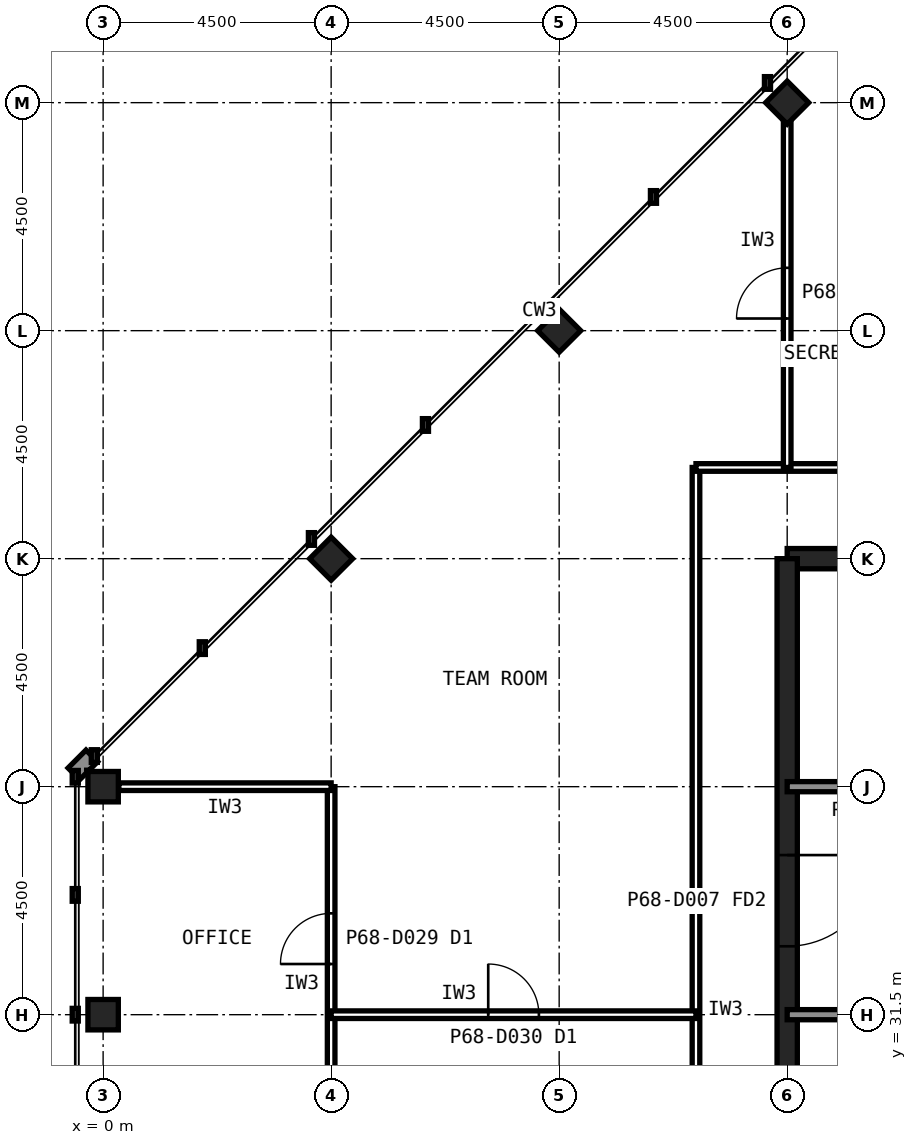
"""IFC4 building model, lengths in metres.
Left out: names, types, materials, properties, quantities, classifications, styles, units other than length and angle.
Written with IfcOpenShell. Run it as: python <this file> out.ifc"""

import sys

from ifc_helpers import new_model, si_unit, direction, frame, frame_2d, origin, origin_2d, place, context, subcontext, project, spatial, rectangle, hollow_rectangle, extrude, element, fill, save


model = new_model("IFC4")
c1 = context("Model", 3, precision=1e-05, world=origin(), true_north=direction((0.0, 1.0)))
c2 = subcontext(c1, "Body", "Model", "MODEL_VIEW")
j1 = project(units=[si_unit("LENGTHUNIT", "METRE"), si_unit("PLANEANGLEUNIT", "RADIAN")], contexts=[c1])
p1 = place(None, origin())
s1 = spatial("IfcSite", under=j1, at=p1, CompositionType="ELEMENT")
p2 = place(p1, origin())
s2 = spatial("IfcBuilding", under=s1, at=p2, CompositionType="ELEMENT")
p3 = place(p2, frame((0.0, 0.0, 286.6)))
s3 = spatial("IfcBuildingStorey", under=s2, at=p3, CompositionType="ELEMENT", Elevation=286.6)
for number, where, z_axis, x_axis in (
    (1, (0.0, 36.0, 0.0), (0.0, 0.0, 1.0), (1.0, 0.0, 0.0)),
    (2, (0.0, 31.5, 0.0), (0.0, 0.0, 1.0), (1.0, 0.0, 0.0)),
    (3, (4.5, 40.5, 0.0), (0.0, 0.0, 1.0), (0.707, 0.707, 0.0)),
    (4, (9.0, 45.0, 0.0), (0.0, 0.0, 1.0), (0.707, 0.707, 0.0)),
    (5, (13.5, 49.5, 0.0), (0.0, 0.0, 1.0), (0.707, 0.707, 0.0)),
):
    element("IfcColumn", number, at=place(p3, frame(where, z_axis=z_axis, x_axis=x_axis)), inside=s3, PredefinedType="COLUMN", context=c2, shape_type="SweptSolid", body=[
        extrude(hollow_rectangle(XDim=0.6, YDim=0.6, WallThickness=0.028, at=origin_2d()), origin(), (0.0, 0.0, 1.0), 4.0),
    ])
p4 = place(p3, frame((40.5, 40.5, 0.0), z_axis=(0.0, 0.0, 1.0), x_axis=(-1.0, 0.0, 0.0)))
e6 = element("IfcWall", 6, at=p4, inside=s3, PredefinedType="SHEAR", context=c2, shape_type="SweptSolid", body=[
    extrude(rectangle(XDim=27.0, YDim=0.4, at=frame_2d((13.5, 0.0))), origin(), (0.0, 0.0, 1.0), 4.0),
])
p5 = place(p3, frame((13.5, 40.5, 0.0), z_axis=(0.0, 0.0, 1.0), x_axis=(0.0, -1.0, 0.0)))
e7 = element("IfcWall", 7, at=p5, inside=s3, PredefinedType="SHEAR", context=c2, shape_type="SweptSolid", body=[
    extrude(rectangle(XDim=27.0, YDim=0.4, at=frame_2d((13.5, 0.0))), origin(), (0.0, 0.0, 1.0), 4.0),
])
p6 = place(p5, frame((19.65, 0.0, 0.0)))
e8 = element("IfcOpeningElement", 8, at=p6, cuts=e7, PredefinedType="OPENING", context=c2, shape_type="SweptSolid", body=[
    extrude(rectangle(XDim=1.2, YDim=2.1, at=frame_2d((0.6, 1.05))), frame((0.0, 0.21, 0.0), z_axis=(0.0, -1.0, 0.0), x_axis=(1.0, 0.0, 0.0)), (0.0, 0.0, 1.0), 0.42),
])
p7 = place(p5, frame((5.85, 0.0, 0.0)))
e9 = element("IfcOpeningElement", 9, at=p7, cuts=e7, PredefinedType="OPENING", context=c2, shape_type="SweptSolid", body=[
    extrude(rectangle(XDim=1.8, YDim=2.1, at=frame_2d((0.9, 1.05))), frame((0.0, 0.21, 0.0), z_axis=(0.0, -1.0, 0.0), x_axis=(1.0, 0.0, 0.0)), (0.0, 0.0, 1.0), 0.42),
])
p8 = place(p3, frame((13.5, 36.0, 0.0), z_axis=(0.0, 0.0, 1.0), x_axis=(1.0, 0.0, 0.0)))
e10 = element("IfcWall", 10, at=p8, inside=s3, PredefinedType="SOLIDWALL", context=c2, shape_type="SweptSolid", body=[
    extrude(rectangle(XDim=27.0, YDim=0.2, at=frame_2d((13.5, 0.0))), origin(), (0.0, 0.0, 1.0), 3.84),
])
p9 = place(p8, frame((1.8, 0.0, 0.0)))
e11 = element("IfcOpeningElement", 11, at=p9, cuts=e10, PredefinedType="OPENING", context=c2, shape_type="SweptSolid", body=[
    extrude(rectangle(XDim=0.9, YDim=2.1, at=frame_2d((0.45, 1.05))), frame((0.0, 0.11, 0.0), z_axis=(0.0, -1.0, 0.0), x_axis=(1.0, 0.0, 0.0)), (0.0, 0.0, 1.0), 0.22),
])
p10 = place(p8, frame((5.55, 0.0, 0.0)))
e12 = element("IfcOpeningElement", 12, at=p10, cuts=e10, PredefinedType="OPENING", context=c2, shape_type="SweptSolid", body=[
    extrude(rectangle(XDim=0.9, YDim=2.1, at=frame_2d((0.45, 1.05))), frame((0.0, 0.11, 0.0), z_axis=(0.0, -1.0, 0.0), x_axis=(1.0, 0.0, 0.0)), (0.0, 0.0, 1.0), 0.22),
])
p11 = place(p8, frame((14.55, 0.0, 0.0)))
e13 = element("IfcOpeningElement", 13, at=p11, cuts=e10, PredefinedType="OPENING", context=c2, shape_type="SweptSolid", body=[
    extrude(rectangle(XDim=0.9, YDim=2.1, at=frame_2d((0.45, 1.05))), frame((0.0, 0.11, 0.0), z_axis=(0.0, -1.0, 0.0), x_axis=(1.0, 0.0, 0.0)), (0.0, 0.0, 1.0), 0.22),
])
p12 = place(p8, frame((17.55, 0.0, 0.0)))
e14 = element("IfcOpeningElement", 14, at=p12, cuts=e10, PredefinedType="OPENING", context=c2, shape_type="SweptSolid", body=[
    extrude(rectangle(XDim=0.9, YDim=2.1, at=frame_2d((0.45, 1.05))), frame((0.0, 0.11, 0.0), z_axis=(0.0, -1.0, 0.0), x_axis=(1.0, 0.0, 0.0)), (0.0, 0.0, 1.0), 0.22),
])
p13 = place(p8, frame((24.1, 0.0, 0.0)))
e15 = element("IfcOpeningElement", 15, at=p13, cuts=e10, PredefinedType="OPENING", context=c2, shape_type="SweptSolid", body=[
    extrude(rectangle(XDim=1.3, YDim=2.2, at=frame_2d((0.65, 1.1))), frame((0.0, 0.11, 0.0), z_axis=(0.0, -1.0, 0.0), x_axis=(1.0, 0.0, 0.0)), (0.0, 0.0, 1.0), 0.22),
])
p14 = place(p3, frame((13.5, 31.5, 0.0), z_axis=(0.0, 0.0, 1.0), x_axis=(1.0, 0.0, 0.0)))
e16 = element("IfcWall", 16, at=p14, inside=s3, PredefinedType="SOLIDWALL", context=c2, shape_type="SweptSolid", body=[
    extrude(rectangle(XDim=27.0, YDim=0.2, at=frame_2d((13.5, 0.0))), origin(), (0.0, 0.0, 1.0), 3.84),
])
p15 = place(p14, frame((24.15, 0.0, 0.0)))
e17 = element("IfcOpeningElement", 17, at=p15, cuts=e16, PredefinedType="OPENING", context=c2, shape_type="SweptSolid", body=[
    extrude(rectangle(XDim=1.2, YDim=2.1, at=frame_2d((0.6, 1.05))), frame((0.0, 0.11, 0.0), z_axis=(0.0, -1.0, 0.0), x_axis=(1.0, 0.0, 0.0)), (0.0, 0.0, 1.0), 0.22),
])
p16 = place(p14, frame((15.3, 0.0, 0.0)))
e18 = element("IfcOpeningElement", 18, at=p16, cuts=e16, PredefinedType="OPENING", context=c2, shape_type="SweptSolid", body=[
    extrude(rectangle(XDim=0.9, YDim=2.1, at=frame_2d((0.45, 1.05))), frame((0.0, 0.11, 0.0), z_axis=(0.0, -1.0, 0.0), x_axis=(1.0, 0.0, 0.0)), (0.0, 0.0, 1.0), 0.22),
])
p17 = place(p14, frame((19.8, 0.0, 0.0)))
e19 = element("IfcOpeningElement", 19, at=p17, cuts=e16, PredefinedType="OPENING", context=c2, shape_type="SweptSolid", body=[
    extrude(rectangle(XDim=0.9, YDim=2.1, at=frame_2d((0.45, 1.05))), frame((0.0, 0.11, 0.0), z_axis=(0.0, -1.0, 0.0), x_axis=(1.0, 0.0, 0.0)), (0.0, 0.0, 1.0), 0.22),
])
p18 = place(p3, frame((11.7, 42.3, 0.0), z_axis=(0.0, 0.0, 1.0), x_axis=(0.0, -1.0, 0.0)))
e20 = element("IfcWall", 20, at=p18, inside=s3, PredefinedType="PARTITIONING", context=c2, shape_type="SweptSolid", body=[
    extrude(rectangle(XDim=30.6, YDim=0.15, at=frame_2d((15.3, 0.0))), origin(), (0.0, 0.0, 1.0), 3.84),
])
p19 = place(p18, frame((14.8, 0.0, 0.0)))
e21 = element("IfcOpeningElement", 21, at=p19, cuts=e20, PredefinedType="OPENING", context=c2, shape_type="SweptSolid", body=[
    extrude(rectangle(XDim=1.0, YDim=2.1, at=frame_2d((0.5, 1.05))), frame((0.0, 0.085, 0.0), z_axis=(0.0, -1.0, 0.0), x_axis=(1.0, 0.0, 0.0)), (0.0, 0.0, 1.0), 0.17),
])
p20 = place(p3, frame((29.7, 42.3, 0.0), z_axis=(0.0, 0.0, 1.0), x_axis=(-1.0, 0.0, 0.0)))
e22 = element("IfcWall", 22, at=p20, inside=s3, PredefinedType="PARTITIONING", context=c2, shape_type="SweptSolid", body=[
    extrude(rectangle(XDim=18.0, YDim=0.15, at=frame_2d((9.0, 0.0))), origin(), (0.0, 0.0, 1.0), 3.84),
])
p21 = place(p20, frame((8.5, 0.0, 0.0)))
e23 = element("IfcOpeningElement", 23, at=p21, cuts=e22, PredefinedType="OPENING", context=c2, shape_type="SweptSolid", body=[
    extrude(rectangle(XDim=1.0, YDim=2.1, at=frame_2d((0.5, 1.05))), frame((0.0, 0.085, 0.0), z_axis=(0.0, -1.0, 0.0), x_axis=(1.0, 0.0, 0.0)), (0.0, 0.0, 1.0), 0.17),
])
p22 = place(p3, frame((4.5, 30.0, 0.0), z_axis=(0.0, 0.0, 1.0), x_axis=(0.0, 1.0, 0.0)))
e24 = element("IfcWall", 24, at=p22, inside=s3, PredefinedType="PARTITIONING", context=c2, shape_type="SweptSolid", body=[
    extrude(rectangle(XDim=6.0, YDim=0.15, at=frame_2d((3.0, 0.0))), origin(), (0.0, 0.0, 1.0), 3.84),
])
p23 = place(p22, frame((2.5, 0.0, 0.0)))
e25 = element("IfcOpeningElement", 25, at=p23, cuts=e24, PredefinedType="OPENING", context=c2, shape_type="SweptSolid", body=[
    extrude(rectangle(XDim=1.0, YDim=2.1, at=frame_2d((0.5, 1.05))), frame((0.0, 0.085, 0.0), z_axis=(0.0, -1.0, 0.0), x_axis=(1.0, 0.0, 0.0)), (0.0, 0.0, 1.0), 0.17),
])
p24 = place(p3, frame((4.5, 36.0, 0.0), z_axis=(0.0, 0.0, 1.0), x_axis=(-1.0, 0.0, 0.0)))
e26 = element("IfcWall", 26, at=p24, inside=s3, PredefinedType="PARTITIONING", context=c2, shape_type="SweptSolid", body=[
    extrude(rectangle(XDim=4.19, YDim=0.15, at=frame_2d((2.095, 0.0))), origin(), (0.0, 0.0, 1.0), 2.989),
])
p25 = place(p3, frame((13.5, 42.3, 0.0), z_axis=(0.0, 0.0, 1.0), x_axis=(0.0, 1.0, 0.0)))
e27 = element("IfcWall", 27, at=p25, inside=s3, PredefinedType="PARTITIONING", context=c2, shape_type="SweptSolid", body=[
    extrude(rectangle(XDim=6.88, YDim=0.15, at=frame_2d((3.44, 0.0))), origin(), (0.0, 0.0, 1.0), 2.989),
])
p26 = place(p25, frame((2.94, 0.0, 0.0)))
e28 = element("IfcOpeningElement", 28, at=p26, cuts=e27, PredefinedType="OPENING", context=c2, shape_type="SweptSolid", body=[
    extrude(rectangle(XDim=1.0, YDim=2.1, at=frame_2d((0.5, 1.05))), frame((0.0, 0.085, 0.0), z_axis=(0.0, -1.0, 0.0), x_axis=(1.0, 0.0, 0.0)), (0.0, 0.0, 1.0), 0.17),
])
p27 = place(p3, frame((4.5, 31.5, 0.0), z_axis=(0.0, 0.0, 1.0), x_axis=(1.0, 0.0, 0.0)))
e29 = element("IfcWall", 29, at=p27, inside=s3, PredefinedType="PARTITIONING", context=c2, shape_type="SweptSolid", body=[
    extrude(rectangle(XDim=7.2, YDim=0.15, at=frame_2d((3.6, 0.0))), origin(), (0.0, 0.0, 1.0), 2.989),
])
p28 = place(p27, frame((3.1, 0.0, 0.0)))
e30 = element("IfcOpeningElement", 30, at=p28, cuts=e29, PredefinedType="OPENING", context=c2, shape_type="SweptSolid", body=[
    extrude(rectangle(XDim=1.0, YDim=2.1, at=frame_2d((0.5, 1.05))), frame((0.0, 0.085, 0.0), z_axis=(0.0, -1.0, 0.0), x_axis=(1.0, 0.0, 0.0)), (0.0, 0.0, 1.0), 0.17),
])
p29 = place(p7, origin())
e31 = element("IfcDoor", 31, at=p29, inside=s3, OperationType="SINGLE_SWING_LEFT", PredefinedType="DOOR", context=c2, shape_type="SweptSolid", body=[
    extrude(rectangle(XDim=1.8, YDim=2.1, at=frame_2d((0.9, 1.05))), frame((0.0, 0.025, 0.0), z_axis=(0.0, -1.0, 0.0), x_axis=(1.0, 0.0, 0.0)), (0.0, 0.0, 1.0), 0.05),
])
fill(e9, e31)
p30 = place(p23, origin())
e32 = element("IfcDoor", 32, at=p30, inside=s3, OperationType="SINGLE_SWING_LEFT", PredefinedType="DOOR", context=c2, shape_type="SweptSolid", body=[
    extrude(rectangle(XDim=1.0, YDim=2.1, at=frame_2d((0.5, 1.05))), frame((0.0, 0.025, 0.0), z_axis=(0.0, -1.0, 0.0), x_axis=(1.0, 0.0, 0.0)), (0.0, 0.0, 1.0), 0.05),
])
fill(e25, e32)
p31 = place(p26, origin())
e33 = element("IfcDoor", 33, at=p31, inside=s3, OperationType="SINGLE_SWING_LEFT", PredefinedType="DOOR", context=c2, shape_type="SweptSolid", body=[
    extrude(rectangle(XDim=1.0, YDim=2.1, at=frame_2d((0.5, 1.05))), frame((0.0, 0.025, 0.0), z_axis=(0.0, -1.0, 0.0), x_axis=(1.0, 0.0, 0.0)), (0.0, 0.0, 1.0), 0.05),
])
fill(e28, e33)
p32 = place(p28, origin())
e34 = element("IfcDoor", 34, at=p32, inside=s3, OperationType="SINGLE_SWING_LEFT", PredefinedType="DOOR", context=c2, shape_type="SweptSolid", body=[
    extrude(rectangle(XDim=1.0, YDim=2.1, at=frame_2d((0.5, 1.05))), frame((0.0, 0.025, 0.0), z_axis=(0.0, -1.0, 0.0), x_axis=(1.0, 0.0, 0.0)), (0.0, 0.0, 1.0), 0.05),
])
fill(e30, e34)
save(model, sys.argv[1])
